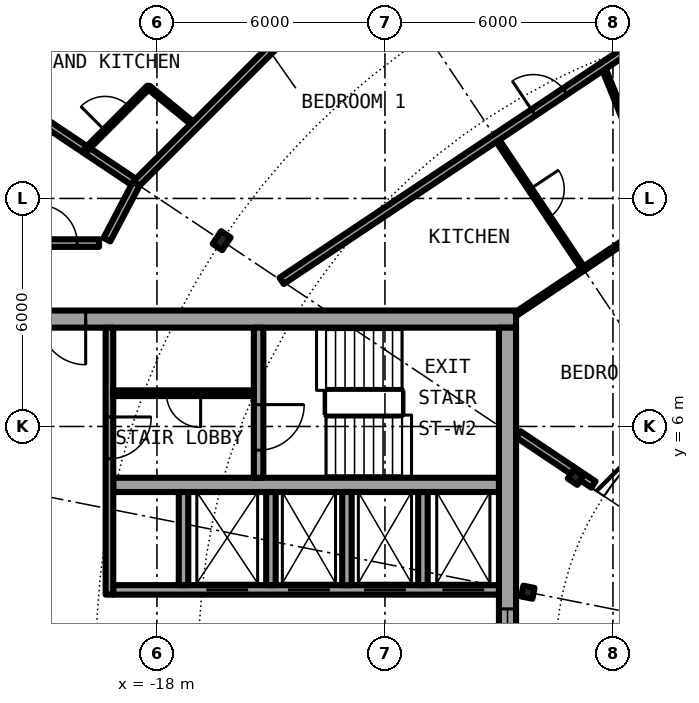
"""IFC4 building model, lengths in metres.
Left out: names, types, materials, properties, quantities, classifications, styles, units other than length and angle.
Written with IfcOpenShell. Run it as: python <this file> out.ifc"""

import sys

from ifc_helpers import new_model, si_unit, direction, frame, frame_2d, origin, origin_2d, place, context, subcontext, project, spatial, rectangle, i_section, extrude, element, fill, save


model = new_model("IFC4")
c1 = context("Model", 3, precision=1e-05, world=origin(), true_north=direction((0.0, 1.0)))
c2 = subcontext(c1, "Body", "Model", "MODEL_VIEW")
j1 = project(units=[si_unit("LENGTHUNIT", "METRE"), si_unit("PLANEANGLEUNIT", "RADIAN")], contexts=[c1])
p1 = place(None, origin())
s1 = spatial("IfcSite", under=j1, at=p1, CompositionType="ELEMENT")
p2 = place(p1, origin())
s2 = spatial("IfcBuilding", under=s1, at=p2, CompositionType="ELEMENT")
p3 = place(p2, frame((0.0, 0.0, 196.3)))
s3 = spatial("IfcBuildingStorey", under=s2, at=p3, CompositionType="ELEMENT", Elevation=196.3)
p4 = place(p3, frame((-16.297, 10.889, 0.0), z_axis=(0.0, 0.0, 1.0), x_axis=(-0.831469612303, 0.55557023302, 0.0)))
e1 = element("IfcColumn", 1, at=p4, inside=s3, PredefinedType="COLUMN", context=c2, shape_type="SweptSolid", body=[
    extrude(i_section(OverallWidth=0.3, OverallDepth=0.4, WebThickness=0.013, FlangeThickness=0.024, FilletRadius=0.027, at=origin_2d()), origin(), (0.0, 0.0, 1.0), 3.05),
])
for number, where, z_axis, x_axis in (
    (2, (-6.984, 4.667, 0.0), (0.0, 0.0, 1.0), (-0.831, 0.556, 0.0)),
    (3, (-8.239, 1.639, 0.0), (0.0, 0.0, 1.0), (-0.981, 0.195, 0.0)),
):
    element("IfcColumn", number, at=place(p3, frame(where, z_axis=z_axis, x_axis=x_axis)), inside=s3, PredefinedType="COLUMN", context=c2, shape_type="SweptSolid", body=[
        extrude(i_section(OverallWidth=0.3, OverallDepth=0.29, WebThickness=0.009, FlangeThickness=0.014, FilletRadius=0.027, at=origin_2d()), origin(), (0.0, 0.0, 1.0), 3.05),
    ])
p5 = place(p3, frame((-19.304, 19.304, 0.0), z_axis=(0.0, 0.0, 1.0), x_axis=(-0.634382322723, -0.773019449054, 0.0)))
e4 = element("IfcWall", 4, at=p5, inside=s3, PredefinedType="SOLIDWALL", context=c2, shape_type="SweptSolid", body=[
    extrude(rectangle(XDim=5.352, YDim=0.25, at=frame_2d((2.676, 0.0))), origin(), (0.0, 0.0, 1.0), 2.7),
])
p6 = place(p5, frame((0.841, 0.0, 0.0)))
e5 = element("IfcOpeningElement", 5, at=p6, cuts=e4, PredefinedType="OPENING", context=c2, shape_type="SweptSolid", body=[
    extrude(rectangle(XDim=1.0, YDim=2.2, at=frame_2d((0.5, 1.1))), frame((0.0, 0.135, 0.0), z_axis=(0.0, -1.0, 0.0), x_axis=(1.0, 0.0, 0.0)), (0.0, 0.0, 1.0), 0.27),
])
p7 = place(p5, frame((3.111, 0.0, 0.3)))
e6 = element("IfcOpeningElement", 6, at=p7, cuts=e4, PredefinedType="OPENING", context=c2, shape_type="SweptSolid", body=[
    extrude(rectangle(XDim=1.8, YDim=2.1, at=frame_2d((0.9, 1.05))), frame((0.0, 0.135, 0.0), z_axis=(0.0, -1.0, 0.0), x_axis=(1.0, 0.0, 0.0)), (0.0, 0.0, 1.0), 0.27),
])
p8 = place(p3, frame((-8.55, 8.825, 0.0), z_axis=(0.0, 0.0, 1.0), x_axis=(-1.0, 0.0, 0.0)))
e7 = element("IfcWall", 7, at=p8, inside=s3, PredefinedType="SHEAR", context=c2, shape_type="SweptSolid", body=[
    extrude(rectangle(XDim=13.5, YDim=0.45, at=frame_2d((6.75, 0.0))), origin(), (0.0, 0.0, 1.0), 3.05),
])
p9 = place(p8, frame((11.325, 0.0, 0.0)))
e8 = element("IfcOpeningElement", 8, at=p9, cuts=e7, PredefinedType="OPENING", context=c2, shape_type="SweptSolid", body=[
    extrude(rectangle(XDim=1.2, YDim=2.3, at=frame_2d((0.6, 1.15))), frame((0.0, 0.235, 0.0), z_axis=(0.0, -1.0, 0.0), x_axis=(1.0, 0.0, 0.0)), (0.0, 0.0, 1.0), 0.47),
])
p10 = place(p3, frame((-8.775, 8.6, 0.0), z_axis=(0.0, 0.0, 1.0), x_axis=(0.0, -1.0, 0.0)))
e9 = element("IfcWall", 9, at=p10, inside=s3, PredefinedType="SHEAR", context=c2, shape_type="SweptSolid", body=[
    extrude(rectangle(XDim=17.2, YDim=0.45, at=frame_2d((8.6, 0.0))), origin(), (0.0, 0.0, 1.0), 3.05),
])
p11 = place(p10, frame((7.4, 0.0, 0.1)))
e10 = element("IfcOpeningElement", 10, at=p11, cuts=e9, PredefinedType="OPENING", context=c2, shape_type="SweptSolid", body=[
    extrude(rectangle(XDim=2.4, YDim=2.2, at=frame_2d((1.2, 1.1))), frame((0.0, 0.235, 0.0), z_axis=(0.0, -1.0, 0.0), x_axis=(1.0, 0.0, 0.0)), (0.0, 0.0, 1.0), 0.47),
])
p12 = place(p3, frame((-9.0, 1.7, 0.0), z_axis=(0.0, 0.0, 1.0), x_axis=(-1.0, 0.0, 0.0)))
e11 = element("IfcWall", 11, at=p12, inside=s3, PredefinedType="SHEAR", context=c2, shape_type="SweptSolid", body=[
    extrude(rectangle(XDim=10.15, YDim=0.25, at=frame_2d((5.075, 0.0))), origin(), (0.0, 0.0, 1.0), 3.05),
])
p13 = place(p12, frame((0.387, 0.0, 0.0)))
e12 = element("IfcOpeningElement", 12, at=p13, cuts=e11, PredefinedType="OPENING", context=c2, shape_type="SweptSolid", body=[
    extrude(rectangle(XDim=1.1, YDim=2.3, at=frame_2d((0.55, 1.15))), frame((0.0, 0.135, 0.0), z_axis=(0.0, -1.0, 0.0), x_axis=(1.0, 0.0, 0.0)), (0.0, 0.0, 1.0), 0.27),
])
p14 = place(p12, frame((2.45, 0.0, 0.0)))
e13 = element("IfcOpeningElement", 13, at=p14, cuts=e11, PredefinedType="OPENING", context=c2, shape_type="SweptSolid", body=[
    extrude(rectangle(XDim=1.1, YDim=2.3, at=frame_2d((0.55, 1.15))), frame((0.0, 0.135, 0.0), z_axis=(0.0, -1.0, 0.0), x_axis=(1.0, 0.0, 0.0)), (0.0, 0.0, 1.0), 0.27),
])
p15 = place(p12, frame((4.45, 0.0, 0.0)))
e14 = element("IfcOpeningElement", 14, at=p15, cuts=e11, PredefinedType="OPENING", context=c2, shape_type="SweptSolid", body=[
    extrude(rectangle(XDim=1.1, YDim=2.3, at=frame_2d((0.55, 1.15))), frame((0.0, 0.135, 0.0), z_axis=(0.0, -1.0, 0.0), x_axis=(1.0, 0.0, 0.0)), (0.0, 0.0, 1.0), 0.27),
])
p16 = place(p12, frame((6.6, 0.0, 0.0)))
e15 = element("IfcOpeningElement", 15, at=p16, cuts=e11, PredefinedType="OPENING", context=c2, shape_type="SweptSolid", body=[
    extrude(rectangle(XDim=1.1, YDim=2.3, at=frame_2d((0.55, 1.15))), frame((0.0, 0.135, 0.0), z_axis=(0.0, -1.0, 0.0), x_axis=(1.0, 0.0, 0.0)), (0.0, 0.0, 1.0), 0.27),
])
p17 = place(p3, frame((-9.0, 4.462, 0.0), z_axis=(0.0, 0.0, 1.0), x_axis=(-1.0, 0.0, 0.0)))
e16 = element("IfcWall", 16, at=p17, inside=s3, PredefinedType="SHEAR", context=c2, shape_type="SweptSolid", body=[
    extrude(rectangle(XDim=10.15, YDim=0.375, at=frame_2d((5.075, 0.0))), origin(), (0.0, 0.0, 1.0), 3.05),
])
p18 = place(p3, frame((-15.325, 8.6, 0.0), z_axis=(0.0, 0.0, 1.0), x_axis=(0.0, -1.0, 0.0)))
e17 = element("IfcWall", 17, at=p18, inside=s3, PredefinedType="SHEAR", context=c2, shape_type="SweptSolid", body=[
    extrude(rectangle(XDim=3.95, YDim=0.25, at=frame_2d((1.975, 0.0))), origin(), (0.0, 0.0, 1.0), 3.05),
])
p19 = place(p18, frame((2.025, 0.0, 0.0)))
e18 = element("IfcOpeningElement", 18, at=p19, cuts=e17, PredefinedType="OPENING", context=c2, shape_type="SweptSolid", body=[
    extrude(rectangle(XDim=1.2, YDim=2.3, at=frame_2d((0.6, 1.15))), frame((0.0, 0.135, 0.0), z_axis=(0.0, -1.0, 0.0), x_axis=(1.0, 0.0, 0.0)), (0.0, 0.0, 1.0), 0.27),
])
for number, where, z_axis, x_axis in (
    (19, (-15.0, 1.825, 0.0), (0.0, 0.0, 1.0), (0.0, 1.0, 0.0)),
    (20, (-17.3, 1.825, 0.0), (0.0, 0.0, 1.0), (0.0, 1.0, 0.0)),
):
    element("IfcWall", number, at=place(p3, frame(where, z_axis=z_axis, x_axis=x_axis)), inside=s3, PredefinedType="SOLIDWALL", context=c2, shape_type="SweptSolid", body=[
        extrude(rectangle(XDim=2.45, YDim=0.25, at=frame_2d((1.225, 0.0))), origin(), (0.0, 0.0, 1.0), 2.7),
    ])
p20 = place(p3, frame((-19.25, 8.6, 0.0), z_axis=(0.0, 0.0, 1.0), x_axis=(0.0, -1.0, 0.0)))
e21 = element("IfcWall", 21, at=p20, inside=s3, PredefinedType="SOLIDWALL", context=c2, shape_type="SweptSolid", body=[
    extrude(rectangle(XDim=7.025, YDim=0.2, at=frame_2d((3.513, 0.0))), origin(), (0.0, 0.0, 1.0), 2.7),
])
p21 = place(p20, frame((2.35, 0.0, 0.0)))
e22 = element("IfcOpeningElement", 22, at=p21, cuts=e21, PredefinedType="OPENING", context=c2, shape_type="SweptSolid", body=[
    extrude(rectangle(XDim=1.1, YDim=2.3, at=frame_2d((0.55, 1.15))), frame((0.0, 0.11, 0.0), z_axis=(0.0, -1.0, 0.0), x_axis=(1.0, 0.0, 0.0)), (0.0, 0.0, 1.0), 0.22),
])
for number, where, z_axis, x_axis in (
    (23, (-11.0, 1.825, 0.0), (0.0, 0.0, 1.0), (0.0, 1.0, 0.0)),
    (24, (-13.0, 1.825, 0.0), (0.0, 0.0, 1.0), (0.0, 1.0, 0.0)),
):
    element("IfcWall", number, at=place(p3, frame(where, z_axis=z_axis, x_axis=x_axis)), inside=s3, PredefinedType="SOLIDWALL", context=c2, shape_type="SweptSolid", body=[
        extrude(rectangle(XDim=2.45, YDim=0.25, at=frame_2d((1.225, 0.0))), origin(), (0.0, 0.0, 1.0), 2.7),
    ])
p22 = place(p3, frame((-15.45, 6.875, 0.0), z_axis=(0.0, 0.0, 1.0), x_axis=(-1.0, 0.0, 0.0)))
e25 = element("IfcWall", 25, at=p22, inside=s3, PredefinedType="PARTITIONING", context=c2, shape_type="SweptSolid", body=[
    extrude(rectangle(XDim=3.7, YDim=0.15, at=frame_2d((1.85, 0.0))), origin(), (0.0, 0.0, 1.0), 2.7),
])
p23 = place(p22, frame((1.4, 0.0, 0.0)))
e26 = element("IfcOpeningElement", 26, at=p23, cuts=e25, PredefinedType="OPENING", context=c2, shape_type="SweptSolid", body=[
    extrude(rectangle(XDim=0.9, YDim=2.3, at=frame_2d((0.45, 1.15))), frame((0.0, 0.085, 0.0), z_axis=(0.0, -1.0, 0.0), x_axis=(1.0, 0.0, 0.0)), (0.0, 0.0, 1.0), 0.17),
])
p24 = place(p3, frame((-18.224, 14.927, 0.0), z_axis=(0.0, 0.0, 1.0), x_axis=(0.773446828454, -0.633861186344, 0.0)))
e27 = element("IfcWall", 27, at=p24, inside=s3, PredefinedType="PARTITIONING", context=c2, shape_type="SweptSolid", body=[
    extrude(rectangle(XDim=1.578, YDim=0.1, at=frame_2d((0.789, 0.0))), origin(), (0.0, 0.0, 1.0), 2.7),
])
p25 = place(p3, frame((-22.595, 15.098, 0.0), z_axis=(0.0, 0.0, 1.0), x_axis=(0.831387096605, -0.55569370664, 0.0)))
e28 = element("IfcWall", 28, at=p25, inside=s3, PredefinedType="PARTITIONING", context=c2, shape_type="SweptSolid", body=[
    extrude(rectangle(XDim=4.875, YDim=0.2, at=frame_2d((2.438, 0.0))), origin(), (0.0, 0.0, 1.0), 2.7),
])
p26 = place(p3, frame((-9.085, 13.597, 0.0), z_axis=(0.0, 0.0, 1.0), x_axis=(0.555528237031, -0.831497671591, 0.0)))
e29 = element("IfcWall", 29, at=p26, inside=s3, PredefinedType="PARTITIONING", context=c2, shape_type="SweptSolid", body=[
    extrude(rectangle(XDim=4.149, YDim=0.1, at=frame_2d((2.075, 0.0))), origin(), (0.0, 0.0, 1.0), 2.7),
])
p27 = place(p26, frame((1.625, 0.0, 0.0)))
e30 = element("IfcOpeningElement", 30, at=p27, cuts=e29, PredefinedType="OPENING", context=c2, shape_type="SweptSolid", body=[
    extrude(rectangle(XDim=0.9, YDim=2.3, at=frame_2d((0.45, 1.15))), frame((0.0, 0.06, 0.0), z_axis=(0.0, -1.0, 0.0), x_axis=(1.0, 0.0, 0.0)), (0.0, 0.0, 1.0), 0.12),
])
p28 = place(p3, frame((-6.269, 15.478, 0.0), z_axis=(0.0, 0.0, 1.0), x_axis=(0.375509828455, -0.926818411952, 0.0)))
e31 = element("IfcWall", 31, at=p28, inside=s3, PredefinedType="PARTITIONING", context=c2, shape_type="SweptSolid", body=[
    extrude(rectangle(XDim=4.237, YDim=0.1, at=frame_2d((2.119, 0.0))), origin(), (0.0, 0.0, 1.0), 2.7),
])
p29 = place(p28, frame((1.669, 0.0, 0.0)))
e32 = element("IfcOpeningElement", 32, at=p29, cuts=e31, PredefinedType="OPENING", context=c2, shape_type="SweptSolid", body=[
    extrude(rectangle(XDim=0.9, YDim=2.3, at=frame_2d((0.45, 1.15))), frame((0.0, 0.06, 0.0), z_axis=(0.0, -1.0, 0.0), x_axis=(1.0, 0.0, 0.0)), (0.0, 0.0, 1.0), 0.12),
])
p30 = place(p3, frame((-6.513, 4.472, 0.0), z_axis=(0.0, 0.0, 1.0), x_axis=(-0.831403409976, 0.555669299026, 0.0)))
e33 = element("IfcWall", 33, at=p30, inside=s3, PredefinedType="PARTITIONING", context=c2, shape_type="SweptSolid", body=[
    extrude(rectangle(XDim=2.383, YDim=0.2, at=frame_2d((1.191, 0.0))), origin(), (0.0, 0.0, 1.0), 2.7),
])
p31 = place(p3, frame((-21.675, 10.825, 0.0), z_axis=(0.0, 0.0, 1.0), x_axis=(1.0, 0.0, 0.0)))
e34 = element("IfcWall", 34, at=p31, inside=s3, PredefinedType="PARTITIONING", context=c2, shape_type="SweptSolid", body=[
    extrude(rectangle(XDim=2.152, YDim=0.2, at=frame_2d((1.076, 0.0))), origin(), (0.0, 0.0, 1.0), 2.7),
])
p32 = place(p31, frame((0.576, 0.0, 0.0)))
e35 = element("IfcOpeningElement", 35, at=p32, cuts=e34, PredefinedType="OPENING", context=c2, shape_type="SweptSolid", body=[
    extrude(rectangle(XDim=1.0, YDim=2.3, at=frame_2d((0.5, 1.15))), frame((0.0, 0.11, 0.0), z_axis=(0.0, -1.0, 0.0), x_axis=(1.0, 0.0, 0.0)), (0.0, 0.0, 1.0), 0.22),
])
p33 = place(p3, frame((-8.55, 8.963, 0.0), z_axis=(0.0, 0.0, 1.0), x_axis=(0.83129689803, 0.555828631257, 0.0)))
e36 = element("IfcWall", 36, at=p33, inside=s3, PredefinedType="PARTITIONING", context=c2, shape_type="SweptSolid", body=[
    extrude(rectangle(XDim=3.394, YDim=0.1, at=frame_2d((1.697, 0.0))), origin(), (0.0, 0.0, 1.0), 2.7),
])
p34 = place(p3, frame((-14.718, 9.832, 0.0), z_axis=(0.0, 0.0, 1.0), x_axis=(0.831437137577, 0.555618831806, 0.0)))
e37 = element("IfcWall", 37, at=p34, inside=s3, PredefinedType="PARTITIONING", context=c2, shape_type="SweptSolid", body=[
    extrude(rectangle(XDim=13.549, YDim=0.2, at=frame_2d((6.774, 0.0))), origin(), (0.0, 0.0, 1.0), 2.7),
])
p35 = place(p34, frame((7.968, 0.0, 0.0)))
e38 = element("IfcOpeningElement", 38, at=p35, cuts=e37, PredefinedType="OPENING", context=c2, shape_type="SweptSolid", body=[
    extrude(rectangle(XDim=1.0, YDim=2.3, at=frame_2d((0.5, 1.15))), frame((0.0, 0.11, 0.0), z_axis=(0.0, -1.0, 0.0), x_axis=(1.0, 0.0, 0.0)), (0.0, 0.0, 1.0), 0.22),
])
p36 = place(p3, frame((-18.542, 12.389, 0.0), z_axis=(0.0, 0.0, 1.0), x_axis=(0.707106781187, 0.707106781187, 0.0)))
e39 = element("IfcWall", 39, at=p36, inside=s3, PredefinedType="PARTITIONING", context=c2, shape_type="SweptSolid", body=[
    extrude(rectangle(XDim=8.702, YDim=0.2, at=frame_2d((4.351, 0.0))), origin(), (0.0, 0.0, 1.0), 2.7),
])
p37 = place(p36, frame((4.938, 0.0, 0.0)))
e40 = element("IfcOpeningElement", 40, at=p37, cuts=e39, PredefinedType="OPENING", context=c2, shape_type="SweptSolid", body=[
    extrude(rectangle(XDim=1.0, YDim=2.3, at=frame_2d((0.5, 1.15))), frame((0.0, 0.11, 0.0), z_axis=(0.0, -1.0, 0.0), x_axis=(1.0, 0.0, 0.0)), (0.0, 0.0, 1.0), 0.22),
])
p38 = place(p3, frame((-19.317, 10.915, 0.0), z_axis=(0.0, 0.0, 1.0), x_axis=(0.465359652486, 0.885121683068, 0.0)))
e41 = element("IfcWall", 41, at=p38, inside=s3, PredefinedType="PARTITIONING", context=c2, shape_type="SweptSolid", body=[
    extrude(rectangle(XDim=1.665, YDim=0.2, at=frame_2d((0.833, 0.0))), origin(), (0.0, 0.0, 1.0), 2.7),
])
p39 = place(p3, frame((-19.867, 13.283, 0.0), z_axis=(0.0, 0.0, 1.0), x_axis=(0.707106781187, 0.707106781187, 0.0)))
e42 = element("IfcWall", 42, at=p39, inside=s3, PredefinedType="PARTITIONING", context=c2, shape_type="SweptSolid", body=[
    extrude(rectangle(XDim=2.332, YDim=0.1, at=frame_2d((1.166, 0.0))), origin(), (0.0, 0.0, 1.0), 2.7),
])
p40 = place(p39, frame((0.709, 0.0, 0.0)))
e43 = element("IfcOpeningElement", 43, at=p40, cuts=e42, PredefinedType="OPENING", context=c2, shape_type="SweptSolid", body=[
    extrude(rectangle(XDim=0.9, YDim=2.3, at=frame_2d((0.45, 1.15))), frame((0.0, 0.06, 0.0), z_axis=(0.0, -1.0, 0.0), x_axis=(1.0, 0.0, 0.0)), (0.0, 0.0, 1.0), 0.12),
])
p41 = place(p13, origin())
e44 = element("IfcDoor", 44, at=p41, inside=s3, OperationType="DOUBLE_DOOR_SLIDING", PredefinedType="DOOR", context=c2, shape_type="SweptSolid", body=[
    extrude(rectangle(XDim=1.1, YDim=2.3, at=frame_2d((0.55, 1.15))), frame((0.0, 0.025, 0.0), z_axis=(0.0, -1.0, 0.0), x_axis=(1.0, 0.0, 0.0)), (0.0, 0.0, 1.0), 0.05),
])
fill(e12, e44)
p42 = place(p14, origin())
e45 = element("IfcDoor", 45, at=p42, inside=s3, OperationType="DOUBLE_DOOR_SLIDING", PredefinedType="DOOR", context=c2, shape_type="SweptSolid", body=[
    extrude(rectangle(XDim=1.1, YDim=2.3, at=frame_2d((0.55, 1.15))), frame((0.0, 0.025, 0.0), z_axis=(0.0, -1.0, 0.0), x_axis=(1.0, 0.0, 0.0)), (0.0, 0.0, 1.0), 0.05),
])
fill(e13, e45)
p43 = place(p15, origin())
e46 = element("IfcDoor", 46, at=p43, inside=s3, OperationType="DOUBLE_DOOR_SLIDING", PredefinedType="DOOR", context=c2, shape_type="SweptSolid", body=[
    extrude(rectangle(XDim=1.1, YDim=2.3, at=frame_2d((0.55, 1.15))), frame((0.0, 0.025, 0.0), z_axis=(0.0, -1.0, 0.0), x_axis=(1.0, 0.0, 0.0)), (0.0, 0.0, 1.0), 0.05),
])
fill(e14, e46)
p44 = place(p16, origin())
e47 = element("IfcDoor", 47, at=p44, inside=s3, OperationType="DOUBLE_DOOR_SLIDING", PredefinedType="DOOR", context=c2, shape_type="SweptSolid", body=[
    extrude(rectangle(XDim=1.1, YDim=2.3, at=frame_2d((0.55, 1.15))), frame((0.0, 0.025, 0.0), z_axis=(0.0, -1.0, 0.0), x_axis=(1.0, 0.0, 0.0)), (0.0, 0.0, 1.0), 0.05),
])
fill(e15, e47)
p45 = place(p23, origin())
e48 = element("IfcDoor", 48, at=p45, inside=s3, OperationType="SINGLE_SWING_LEFT", PredefinedType="DOOR", context=c2, shape_type="SweptSolid", body=[
    extrude(rectangle(XDim=0.9, YDim=2.3, at=frame_2d((0.45, 1.15))), frame((0.0, 0.025, 0.0), z_axis=(0.0, -1.0, 0.0), x_axis=(1.0, 0.0, 0.0)), (0.0, 0.0, 1.0), 0.05),
])
fill(e26, e48)
p46 = place(p19, origin())
e49 = element("IfcDoor", 49, at=p46, inside=s3, OperationType="SINGLE_SWING_LEFT", PredefinedType="DOOR", context=c2, shape_type="SweptSolid", body=[
    extrude(rectangle(XDim=1.2, YDim=2.3, at=frame_2d((0.6, 1.15))), frame((0.0, 0.025, 0.0), z_axis=(0.0, -1.0, 0.0), x_axis=(1.0, 0.0, 0.0)), (0.0, 0.0, 1.0), 0.05),
])
fill(e18, e49)
p47 = place(p21, origin())
e50 = element("IfcDoor", 50, at=p47, inside=s3, OperationType="SINGLE_SWING_RIGHT", PredefinedType="DOOR", context=c2, shape_type="SweptSolid", body=[
    extrude(rectangle(XDim=1.1, YDim=2.3, at=frame_2d((0.55, 1.15))), frame((0.0, 0.025, 0.0), z_axis=(0.0, -1.0, 0.0), x_axis=(1.0, 0.0, 0.0)), (0.0, 0.0, 1.0), 0.05),
])
fill(e22, e50)
p48 = place(p9, origin())
e51 = element("IfcDoor", 51, at=p48, inside=s3, OperationType="SINGLE_SWING_LEFT", PredefinedType="DOOR", context=c2, shape_type="SweptSolid", body=[
    extrude(rectangle(XDim=1.2, YDim=2.3, at=frame_2d((0.6, 1.15))), frame((0.0, 0.025, 0.0), z_axis=(0.0, -1.0, 0.0), x_axis=(1.0, 0.0, 0.0)), (0.0, 0.0, 1.0), 0.05),
])
fill(e8, e51)
p49 = place(p11, origin())
e52 = element("IfcWindow", 52, at=p49, inside=s3, PartitioningType="SINGLE_PANEL", PredefinedType="WINDOW", context=c2, shape_type="SweptSolid", body=[
    extrude(rectangle(XDim=2.4, YDim=2.2, at=frame_2d((1.2, 1.1))), frame((0.0, 0.03, 0.0), z_axis=(0.0, -1.0, 0.0), x_axis=(1.0, 0.0, 0.0)), (0.0, 0.0, 1.0), 0.06),
])
fill(e10, e52)
p50 = place(p40, origin())
e53 = element("IfcDoor", 53, at=p50, inside=s3, OperationType="SINGLE_SWING_LEFT", PredefinedType="DOOR", context=c2, shape_type="SweptSolid", body=[
    extrude(rectangle(XDim=0.9, YDim=2.3, at=frame_2d((0.45, 1.15))), frame((0.0, 0.025, 0.0), z_axis=(0.0, -1.0, 0.0), x_axis=(1.0, 0.0, 0.0)), (0.0, 0.0, 1.0), 0.05),
])
fill(e43, e53)
p51 = place(p35, origin())
e54 = element("IfcDoor", 54, at=p51, inside=s3, OperationType="SINGLE_SWING_RIGHT", PredefinedType="DOOR", context=c2, shape_type="SweptSolid", body=[
    extrude(rectangle(XDim=1.0, YDim=2.3, at=frame_2d((0.5, 1.15))), frame((0.0, 0.025, 0.0), z_axis=(0.0, -1.0, 0.0), x_axis=(1.0, 0.0, 0.0)), (0.0, 0.0, 1.0), 0.05),
])
fill(e38, e54)
p52 = place(p27, origin())
e55 = element("IfcDoor", 55, at=p52, inside=s3, OperationType="SINGLE_SWING_LEFT", PredefinedType="DOOR", context=c2, shape_type="SweptSolid", body=[
    extrude(rectangle(XDim=0.9, YDim=2.3, at=frame_2d((0.45, 1.15))), frame((0.0, 0.025, 0.0), z_axis=(0.0, -1.0, 0.0), x_axis=(1.0, 0.0, 0.0)), (0.0, 0.0, 1.0), 0.05),
])
fill(e30, e55)
p53 = place(p32, origin())
e56 = element("IfcDoor", 56, at=p53, inside=s3, OperationType="SINGLE_SWING_LEFT", PredefinedType="DOOR", context=c2, shape_type="SweptSolid", body=[
    extrude(rectangle(XDim=1.0, YDim=2.3, at=frame_2d((0.5, 1.15))), frame((0.0, 0.025, 0.0), z_axis=(0.0, -1.0, 0.0), x_axis=(1.0, 0.0, 0.0)), (0.0, 0.0, 1.0), 0.05),
])
fill(e35, e56)
save(model, sys.argv[1])
